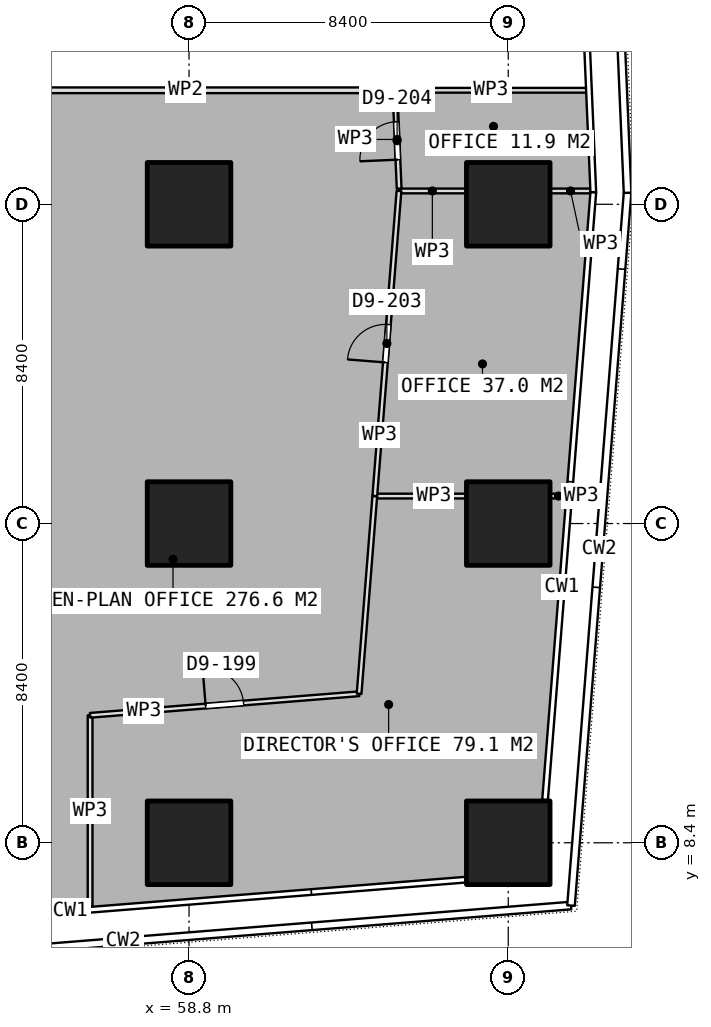
"""IFC4 building model, lengths in metres.
Left out: names, types, materials, properties, quantities, classifications, styles, units other than length and angle.
Written with IfcOpenShell. Run it as: python <this file> out.ifc"""

import sys

from ifc_helpers import new_model, si_unit, direction, frame, frame_2d, origin, origin_2d, place, context, subcontext, project, spatial, rectangle, extrude, element, fill, save


model = new_model("IFC4")
c1 = context("Model", 3, precision=1e-05, world=origin(), true_north=direction((0.0, 1.0)))
c2 = subcontext(c1, "Body", "Model", "MODEL_VIEW")
j1 = project(units=[si_unit("LENGTHUNIT", "METRE"), si_unit("PLANEANGLEUNIT", "RADIAN")], contexts=[c1])
p1 = place(None, origin())
s1 = spatial("IfcSite", under=j1, at=p1, CompositionType="ELEMENT")
p2 = place(p1, origin())
s2 = spatial("IfcBuilding", under=s1, at=p2, CompositionType="ELEMENT")
p3 = place(p2, frame((0.0, 0.0, 62.9)))
s3 = spatial("IfcBuildingStorey", under=s2, at=p3, CompositionType="ELEMENT", Elevation=62.9)
for number, where, z_axis, x_axis in (
    (1, (58.8, 8.4, 0.0), (0.0, 0.0, 1.0), (1.0, 0.0, 0.0)),
    (2, (58.8, 16.8, 0.0), (0.0, 0.0, 1.0), (1.0, 0.0, 0.0)),
    (3, (58.8, 25.2, 0.0), (0.0, 0.0, 1.0), (1.0, 0.0, 0.0)),
    (4, (67.2, 8.4, 0.0), (0.0, 0.0, 1.0), (1.0, 0.0, 0.0)),
    (5, (67.2, 16.8, 0.0), (0.0, 0.0, 1.0), (1.0, 0.0, 0.0)),
    (6, (67.2, 25.2, 0.0), (0.0, 0.0, 1.0), (1.0, 0.0, 0.0)),
):
    element("IfcColumn", number, at=place(p3, frame(where, z_axis=z_axis, x_axis=x_axis)), inside=s3, PredefinedType="COLUMN", context=c2, shape_type="SweptSolid", body=[
        extrude(rectangle(XDim=2.2, YDim=2.2, at=origin_2d()), origin(), (0.0, 0.0, 1.0), 3.75),
    ])
p4 = place(p3, frame((63.688, 17.523, 0.0), z_axis=(0.0, 0.0, 1.0), x_axis=(1.0, 0.0, 0.0)))
e7 = element("IfcWall", 7, at=p4, inside=s3, PredefinedType="PARTITIONING", context=c2, shape_type="SweptSolid", body=[
    extrude(rectangle(XDim=2.392, YDim=0.125, at=frame_2d((1.196, 0.0))), origin(), (0.0, 0.0, 1.0), 3.5),
])
p5 = place(p3, frame((68.32, 17.523, 0.0), z_axis=(0.0, 0.0, 1.0), x_axis=(1.0, 0.0, 0.0)))
e8 = element("IfcWall", 8, at=p5, inside=s3, PredefinedType="PARTITIONING", context=c2, shape_type="SweptSolid", body=[
    extrude(rectangle(XDim=0.403, YDim=0.125, at=frame_2d((0.201, 0.0))), origin(), (0.0, 0.0, 1.0), 3.5),
])
p6 = place(p3, frame((56.197, 6.717, 0.0), z_axis=(0.0, 0.0, 1.0), x_axis=(0.0, 1.0, 0.0)))
e9 = element("IfcWall", 9, at=p6, inside=s3, PredefinedType="PARTITIONING", context=c2, shape_type="SweptSolid", body=[
    extrude(rectangle(XDim=5.037, YDim=0.125, at=frame_2d((2.519, 0.0))), origin(), (0.0, 0.0, 1.0), 3.5),
])
p7 = place(p3, frame((56.197, 11.754, 0.0), z_axis=(0.0, 0.0, 1.0), x_axis=(0.996805103047, 0.079872313973, 0.0)))
e10 = element("IfcWall", 10, at=p7, inside=s3, PredefinedType="PARTITIONING", context=c2, shape_type="SweptSolid", body=[
    extrude(rectangle(XDim=7.101, YDim=0.125, at=frame_2d((3.55, 0.0))), origin(), (0.0, 0.0, 1.0), 3.5),
])
p8 = place(p7, frame((3.05, 0.0, 0.0)))
e11 = element("IfcOpeningElement", 11, at=p8, cuts=e10, PredefinedType="OPENING", context=c2, shape_type="SweptSolid", body=[
    extrude(rectangle(XDim=1.0, YDim=2.1, at=frame_2d((0.5, 1.05))), frame((0.0, 0.073, 0.0), z_axis=(0.0, -1.0, 0.0), x_axis=(1.0, 0.0, 0.0)), (0.0, 0.0, 1.0), 0.145),
])
p9 = place(p3, frame((63.275, 12.321, 0.0), z_axis=(0.0, 0.0, 1.0), x_axis=(0.079161317755, 0.996861818795, 0.0)))
e12 = element("IfcWall", 12, at=p9, inside=s3, PredefinedType="PARTITIONING", context=c2, shape_type="SweptSolid", body=[
    extrude(rectangle(XDim=5.218, YDim=0.125, at=frame_2d((2.609, 0.0))), origin(), (0.0, 0.0, 1.0), 3.5),
])
p10 = place(p3, frame((63.688, 17.524, 0.0), z_axis=(0.0, 0.0, 1.0), x_axis=(0.079102910118, 0.996866455254, 0.0)))
e13 = element("IfcWall", 13, at=p10, inside=s3, PredefinedType="PARTITIONING", context=c2, shape_type="SweptSolid", body=[
    extrude(rectangle(XDim=8.052, YDim=0.125, at=frame_2d((4.026, 0.0))), origin(), (0.0, 0.0, 1.0), 3.5),
])
p11 = place(p10, frame((3.526, 0.0, 0.0)))
e14 = element("IfcOpeningElement", 14, at=p11, cuts=e13, PredefinedType="OPENING", context=c2, shape_type="SweptSolid", body=[
    extrude(rectangle(XDim=1.0, YDim=2.1, at=frame_2d((0.5, 1.05))), frame((0.0, 0.073, 0.0), z_axis=(0.0, -1.0, 0.0), x_axis=(1.0, 0.0, 0.0)), (0.0, 0.0, 1.0), 0.145),
])
p12 = place(p3, frame((64.325, 25.551, 0.0), z_axis=(0.0, 0.0, 1.0), x_axis=(1.0, 0.0, 0.0)))
e15 = element("IfcWall", 15, at=p12, inside=s3, PredefinedType="PARTITIONING", context=c2, shape_type="SweptSolid", body=[
    extrude(rectangle(XDim=1.755, YDim=0.125, at=frame_2d((0.877, 0.0))), origin(), (0.0, 0.0, 1.0), 3.5),
])
p13 = place(p3, frame((68.32, 25.551, 0.0), z_axis=(0.0, 0.0, 1.0), x_axis=(1.0, 0.0, 0.0)))
e16 = element("IfcWall", 16, at=p13, inside=s3, PredefinedType="PARTITIONING", context=c2, shape_type="SweptSolid", body=[
    extrude(rectangle(XDim=1.037, YDim=0.125, at=frame_2d((0.519, 0.0))), origin(), (0.0, 0.0, 1.0), 3.5),
])
p14 = place(p3, frame((64.219, 28.2, 0.0), z_axis=(0.0, 0.0, 1.0), x_axis=(1.0, 0.0, 0.0)))
e17 = element("IfcWall", 17, at=p14, inside=s3, PredefinedType="PARTITIONING", context=c2, shape_type="SweptSolid", body=[
    extrude(rectangle(XDim=5.055, YDim=0.125, at=frame_2d((2.527, 0.0))), origin(), (0.0, 0.0, 1.0), 3.5),
])
p15 = place(p3, frame((64.329, 25.613, 0.0), z_axis=(0.0, 0.0, 1.0), x_axis=(-0.042524729329, 0.99909541456, 0.0)))
e18 = element("IfcWall", 18, at=p15, inside=s3, PredefinedType="PARTITIONING", context=c2, shape_type="SweptSolid", body=[
    extrude(rectangle(XDim=2.589, YDim=0.125, at=frame_2d((1.295, 0.0))), origin(), (0.0, 0.0, 1.0), 3.5),
])
p16 = place(p15, frame((0.762, 0.0, 0.0)))
e19 = element("IfcOpeningElement", 19, at=p16, cuts=e18, PredefinedType="OPENING", context=c2, shape_type="SweptSolid", body=[
    extrude(rectangle(XDim=1.0, YDim=2.1, at=frame_2d((0.5, 1.05))), frame((0.0, 0.073, 0.0), z_axis=(0.0, -1.0, 0.0), x_axis=(1.0, 0.0, 0.0)), (0.0, 0.0, 1.0), 0.145),
])
p17 = place(p3, frame((53.2, 28.2, 0.0), z_axis=(0.0, 0.0, 1.0), x_axis=(1.0, 0.0, 0.0)))
e20 = element("IfcWall", 20, at=p17, inside=s3, PredefinedType="PARTITIONING", context=c2, shape_type="SweptSolid", body=[
    extrude(rectangle(XDim=11.019, YDim=0.15, at=frame_2d((5.51, 0.0))), origin(), (0.0, 0.0, 1.0), 3.5),
])
p18 = place(p8, origin())
e21 = element("IfcDoor", 21, at=p18, inside=s3, OperationType="SINGLE_SWING_LEFT", PredefinedType="DOOR", context=c2, shape_type="SweptSolid", body=[
    extrude(rectangle(XDim=1.0, YDim=2.1, at=frame_2d((0.5, 1.05))), frame((0.0, 0.025, 0.0), z_axis=(0.0, -1.0, 0.0), x_axis=(1.0, 0.0, 0.0)), (0.0, 0.0, 1.0), 0.05),
])
fill(e11, e21)
p19 = place(p11, origin())
e22 = element("IfcDoor", 22, at=p19, inside=s3, OperationType="SINGLE_SWING_LEFT", PredefinedType="DOOR", context=c2, shape_type="SweptSolid", body=[
    extrude(rectangle(XDim=1.0, YDim=2.1, at=frame_2d((0.5, 1.05))), frame((0.0, 0.025, 0.0), z_axis=(0.0, -1.0, 0.0), x_axis=(1.0, 0.0, 0.0)), (0.0, 0.0, 1.0), 0.05),
])
fill(e14, e22)
p20 = place(p16, origin())
e23 = element("IfcDoor", 23, at=p20, inside=s3, OperationType="SINGLE_SWING_LEFT", PredefinedType="DOOR", context=c2, shape_type="SweptSolid", body=[
    extrude(rectangle(XDim=1.0, YDim=2.1, at=frame_2d((0.5, 1.05))), frame((0.0, 0.025, 0.0), z_axis=(0.0, -1.0, 0.0), x_axis=(1.0, 0.0, 0.0)), (0.0, 0.0, 1.0), 0.05),
])
fill(e19, e23)
save(model, sys.argv[1])
